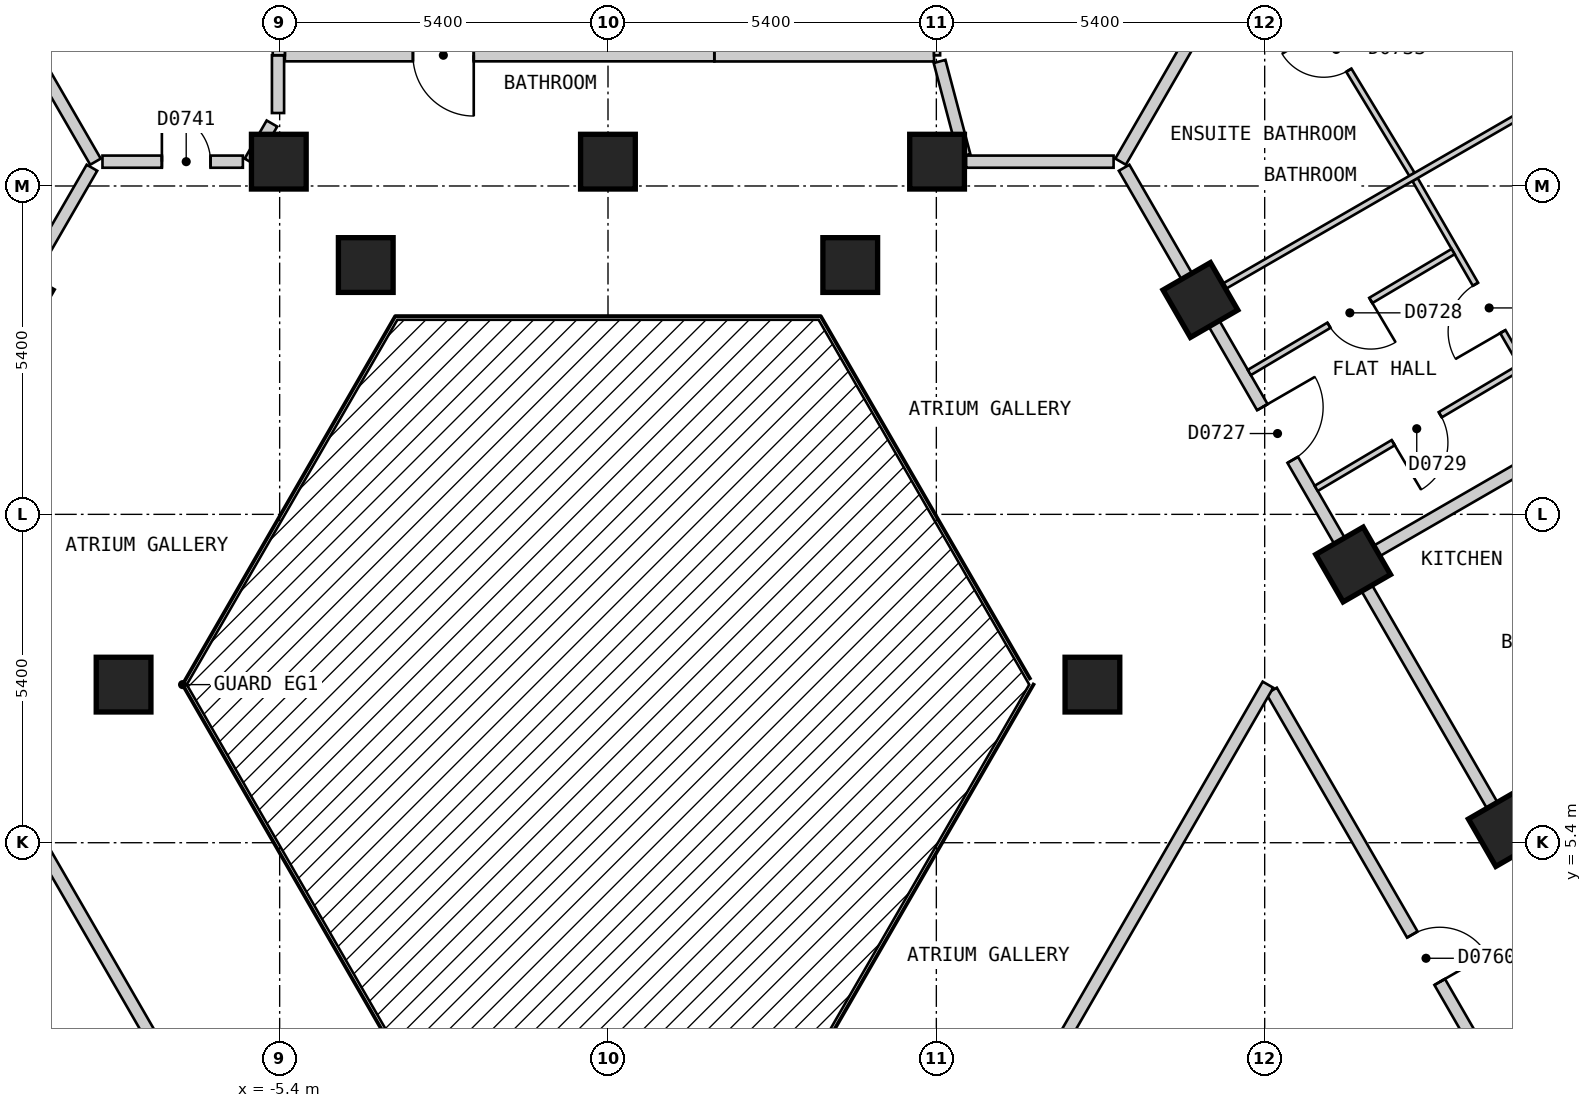
"""IFC4 building model, lengths in metres.
Left out: names, types, materials, properties, quantities, classifications, styles, units other than length and angle.
Written with IfcOpenShell. Run it as: python <this file> out.ifc"""

import sys

from ifc_helpers import new_model, si_unit, direction, frame, frame_2d, origin, origin_2d, place, context, subcontext, project, spatial, rectangle, extrude, element, fill, save


model = new_model("IFC4")
c1 = context("Model", 3, precision=1e-05, world=origin(), true_north=direction((0.0, 1.0)))
c2 = subcontext(c1, "Body", "Model", "MODEL_VIEW")
j1 = project(units=[si_unit("LENGTHUNIT", "METRE"), si_unit("PLANEANGLEUNIT", "RADIAN")], contexts=[c1])
p1 = place(None, origin())
s1 = spatial("IfcSite", under=j1, at=p1, CompositionType="ELEMENT")
p2 = place(p1, origin())
s2 = spatial("IfcBuilding", under=s1, at=p2, CompositionType="ELEMENT")
p3 = place(p2, frame((0.0, 0.0, 93.0)))
s3 = spatial("IfcBuildingStorey", under=s2, at=p3, CompositionType="ELEMENT", Elevation=93.0)
for number, where, z_axis, x_axis in (
    (1, (14.766, 5.625, 0.0), (0.0, 0.0, 1.0), (-0.5, 0.866, 0.0)),
    (2, (12.255, 9.975, 0.0), (0.0, 0.0, 1.0), (-0.5, 0.866, 0.0)),
    (3, (7.967, 8.0, 0.0), (0.0, 0.0, 1.0), (1.0, 0.0, 0.0)),
    (4, (9.743, 14.325, 0.0), (0.0, 0.0, 1.0), (-0.5, 0.866, 0.0)),
    (5, (5.412, 16.6, 0.0), (0.0, 0.0, 1.0), (-1.0, 0.0, 0.0)),
    (6, (3.984, 14.9, 0.0), (0.0, 0.0, 1.0), (1.0, 0.0, 0.0)),
    (7, (-0.001, 16.6, 0.0), (0.0, 0.0, 1.0), (-1.0, 0.0, 0.0)),
    (8, (-3.984, 14.9, 0.0), (0.0, 0.0, 1.0), (1.0, 0.0, 0.0)),
    (9, (-5.414, 16.6, 0.0), (0.0, 0.0, 1.0), (-1.0, 0.0, 0.0)),
    (10, (-9.743, 14.325, 0.0), (0.0, 0.0, 1.0), (-0.5, -0.866, 0.0)),
    (11, (-7.967, 8.0, 0.0), (0.0, 0.0, 1.0), (1.0, 0.0, 0.0)),
):
    element("IfcColumn", number, at=place(p3, frame(where, z_axis=z_axis, x_axis=x_axis)), inside=s3, PredefinedType="COLUMN", context=c2, shape_type="SweptSolid", body=[
        extrude(rectangle(XDim=0.9, YDim=0.9, at=origin_2d()), origin(), (0.0, 0.0, 1.0), 3.0),
    ])
p4 = place(p3, frame((-10.796, 7.899, 0.0), z_axis=(0.0, 0.0, 1.0), x_axis=(0.500010383074, -0.866019409031, 0.0)))
e12 = element("IfcWall", 12, at=p4, inside=s3, PredefinedType="PARTITIONING", context=c2, shape_type="SweptSolid", body=[
    extrude(rectangle(XDim=7.535, YDim=0.2, at=frame_2d((3.768, 0.0))), origin(), (0.0, 0.0, 1.0), 2.7),
])
p5 = place(p3, frame((5.453, 18.248, 0.0), z_axis=(0.0, 0.0, 1.0), x_axis=(0.255687088482, -0.9667595941, 0.0)))
e13 = element("IfcWall", 13, at=p5, inside=s3, PredefinedType="PARTITIONING", context=c2, shape_type="SweptSolid", body=[
    extrude(rectangle(XDim=1.6, YDim=0.2, at=frame_2d((0.8, 0.0))), origin(), (0.0, 0.0, 1.0), 2.7),
])
p6 = place(p3, frame((10.913, 7.899, 0.0), z_axis=(0.0, 0.0, 1.0), x_axis=(0.500028940566, -0.866008694296, 0.0)))
e14 = element("IfcWall", 14, at=p6, inside=s3, PredefinedType="PARTITIONING", context=c2, shape_type="SweptSolid", body=[
    extrude(rectangle(XDim=10.159, YDim=0.2, at=frame_2d((5.08, 0.0))), origin(), (0.0, 0.0, 1.0), 2.7),
])
p7 = place(p6, frame((4.63, 0.0, 0.0)))
e15 = element("IfcOpeningElement", 15, at=p7, cuts=e14, PredefinedType="OPENING", context=c2, shape_type="SweptSolid", body=[
    extrude(rectangle(XDim=0.9, YDim=2.1, at=frame_2d((0.45, 1.05))), frame((0.0, 0.11, 0.0), z_axis=(0.0, -1.0, 0.0), x_axis=(1.0, 0.0, 0.0)), (0.0, 0.0, 1.0), 0.22),
])
p8 = place(p3, frame((8.488, 16.5, 0.0), z_axis=(0.0, 0.0, 1.0), x_axis=(0.499986836607, -0.86603300354, 0.0)))
e16 = element("IfcWall", 16, at=p8, inside=s3, PredefinedType="PARTITIONING", context=c2, shape_type="SweptSolid", body=[
    extrude(rectangle(XDim=20.09, YDim=0.2, at=frame_2d((10.045, 0.0))), origin(), (0.0, 0.0, 1.0), 2.7),
])
p9 = place(p8, frame((14.569, 0.0, 0.0)))
e17 = element("IfcOpeningElement", 17, at=p9, cuts=e16, PredefinedType="OPENING", context=c2, shape_type="SweptSolid", body=[
    extrude(rectangle(XDim=1.0, YDim=2.1, at=frame_2d((0.5, 1.05))), frame((0.0, 0.11, 0.0), z_axis=(0.0, -1.0, 0.0), x_axis=(1.0, 0.0, 0.0)), (0.0, 0.0, 1.0), 0.22),
])
p10 = place(p8, frame((4.547, 0.0, 0.0)))
e18 = element("IfcOpeningElement", 18, at=p10, cuts=e16, PredefinedType="OPENING", context=c2, shape_type="SweptSolid", body=[
    extrude(rectangle(XDim=1.0, YDim=2.1, at=frame_2d((0.5, 1.05))), frame((0.0, 0.11, 0.0), z_axis=(0.0, -1.0, 0.0), x_axis=(1.0, 0.0, 0.0)), (0.0, 0.0, 1.0), 0.22),
])
p11 = place(p3, frame((-8.314, 16.6, 0.0), z_axis=(0.0, 0.0, 1.0), x_axis=(1.0, 0.0, 0.0)))
e19 = element("IfcWall", 19, at=p11, inside=s3, PredefinedType="PARTITIONING", context=c2, shape_type="SweptSolid", body=[
    extrude(rectangle(XDim=2.309, YDim=0.2, at=frame_2d((1.155, 0.0))), origin(), (0.0, 0.0, 1.0), 2.7),
])
p12 = place(p11, frame((0.977, 0.0, 0.0)))
e20 = element("IfcOpeningElement", 20, at=p12, cuts=e19, PredefinedType="OPENING", context=c2, shape_type="SweptSolid", body=[
    extrude(rectangle(XDim=0.8, YDim=2.1, at=frame_2d((0.4, 1.05))), frame((0.0, 0.11, 0.0), z_axis=(0.0, -1.0, 0.0), x_axis=(1.0, 0.0, 0.0)), (0.0, 0.0, 1.0), 0.22),
])
p13 = place(p3, frame((5.889, 16.6, 0.0), z_axis=(0.0, 0.0, 1.0), x_axis=(1.0, 0.0, 0.0)))
e21 = element("IfcWall", 21, at=p13, inside=s3, PredefinedType="PARTITIONING", context=c2, shape_type="SweptSolid", body=[
    extrude(rectangle(XDim=2.426, YDim=0.2, at=frame_2d((1.213, 0.0))), origin(), (0.0, 0.0, 1.0), 2.7),
])
p14 = place(p3, frame((1.75, 18.348, 0.0), z_axis=(0.0, 0.0, 1.0), x_axis=(1.0, 0.0, 0.0)))
e22 = element("IfcWall", 22, at=p14, inside=s3, PredefinedType="PARTITIONING", context=c2, shape_type="SweptSolid", body=[
    extrude(rectangle(XDim=3.612, YDim=0.2, at=frame_2d((1.806, 0.0))), origin(), (0.0, 0.0, 1.0), 2.7),
])
p15 = place(p3, frame((-5.314, 18.35, 0.0), z_axis=(0.0, 0.0, 1.0), x_axis=(1.0, 0.0, 0.0)))
e23 = element("IfcWall", 23, at=p15, inside=s3, PredefinedType="PARTITIONING", context=c2, shape_type="SweptSolid", body=[
    extrude(rectangle(XDim=7.062, YDim=0.2, at=frame_2d((3.531, 0.0))), origin(), (0.0, 0.0, 1.0), 2.7),
])
p16 = place(p15, frame((2.106, 0.0, 0.0)))
e24 = element("IfcOpeningElement", 24, at=p16, cuts=e23, PredefinedType="OPENING", context=c2, shape_type="SweptSolid", body=[
    extrude(rectangle(XDim=1.0, YDim=2.1, at=frame_2d((0.5, 1.05))), frame((0.0, 0.11, 0.0), z_axis=(0.0, -1.0, 0.0), x_axis=(1.0, 0.0, 0.0)), (0.0, 0.0, 1.0), 0.22),
])
p17 = place(p3, frame((6.928, 1.2, 0.0), z_axis=(0.0, 0.0, 1.0), x_axis=(0.500055327065, 0.865993458332, 0.0)))
e25 = element("IfcWall", 25, at=p17, inside=s3, PredefinedType="PARTITIONING", context=c2, shape_type="SweptSolid", body=[
    extrude(rectangle(XDim=7.851, YDim=0.2, at=frame_2d((3.926, 0.0))), origin(), (0.0, 0.0, 1.0), 2.7),
])
p18 = place(p3, frame((-5.889, 16.6, 0.0), z_axis=(0.0, 0.0, 1.0), x_axis=(0.499839240638, 0.866118198353, 0.0)))
e26 = element("IfcWall", 26, at=p18, inside=s3, PredefinedType="PARTITIONING", context=c2, shape_type="SweptSolid", body=[
    extrude(rectangle(XDim=0.724, YDim=0.2, at=frame_2d((0.362, 0.0))), origin(), (0.0, 0.0, 1.0), 2.7),
])
p19 = place(p3, frame((-18.533, -0.901, 0.0), z_axis=(0.0, 0.0, 1.0), x_axis=(0.499981198768, 0.866036258409, 0.0)))
e27 = element("IfcWall", 27, at=p19, inside=s3, PredefinedType="PARTITIONING", context=c2, shape_type="SweptSolid", body=[
    extrude(rectangle(XDim=20.093, YDim=0.2, at=frame_2d((10.046, 0.0))), origin(), (0.0, 0.0, 1.0), 2.7),
])
p20 = place(p19, frame((14.57, 0.0, 0.0)))
e28 = element("IfcOpeningElement", 28, at=p20, cuts=e27, PredefinedType="OPENING", context=c2, shape_type="SweptSolid", body=[
    extrude(rectangle(XDim=1.0, YDim=2.1, at=frame_2d((0.5, 1.05))), frame((0.0, 0.11, 0.0), z_axis=(0.0, -1.0, 0.0), x_axis=(1.0, 0.0, 0.0)), (0.0, 0.0, 1.0), 0.22),
])
p21 = place(p19, frame((4.523, 0.0, 0.0)))
e29 = element("IfcOpeningElement", 29, at=p21, cuts=e27, PredefinedType="OPENING", context=c2, shape_type="SweptSolid", body=[
    extrude(rectangle(XDim=1.0, YDim=2.1, at=frame_2d((0.5, 1.05))), frame((0.0, 0.11, 0.0), z_axis=(0.0, -1.0, 0.0), x_axis=(1.0, 0.0, 0.0)), (0.0, 0.0, 1.0), 0.22),
])
p22 = place(p3, frame((-5.427, 17.4, 0.0), z_axis=(0.0, 0.0, 1.0), x_axis=(0.0, 1.0, 0.0)))
e30 = element("IfcWall", 30, at=p22, inside=s3, PredefinedType="PARTITIONING", context=c2, shape_type="SweptSolid", body=[
    extrude(rectangle(XDim=0.95, YDim=0.2, at=frame_2d((0.475, 0.0))), origin(), (0.0, 0.0, 1.0), 2.7),
])
p23 = place(p3, frame((10.706, 20.543, 0.0), z_axis=(0.0, 0.0, 1.0), x_axis=(0.518240414093, -0.855234981278, 0.0)))
e31 = element("IfcWall", 31, at=p23, inside=s3, PredefinedType="PARTITIONING", context=c2, shape_type="SweptSolid", body=[
    extrude(rectangle(XDim=4.855, YDim=0.1, at=frame_2d((2.427, 0.0))), origin(), (0.0, 0.0, 1.0), 2.7),
])
p24 = place(p23, frame((2.052, 0.0, 0.0)))
e32 = element("IfcOpeningElement", 32, at=p24, cuts=e31, PredefinedType="OPENING", context=c2, shape_type="SweptSolid", body=[
    extrude(rectangle(XDim=0.8, YDim=2.1, at=frame_2d((0.4, 1.05))), frame((0.0, 0.06, 0.0), z_axis=(0.0, -1.0, 0.0), x_axis=(1.0, 0.0, 0.0)), (0.0, 0.0, 1.0), 0.12),
])
p25 = place(p3, frame((13.273, 16.305, 0.0), z_axis=(0.0, 0.0, 1.0), x_axis=(0.500093956194, -0.865971151354, 0.0)))
e33 = element("IfcWall", 33, at=p25, inside=s3, PredefinedType="PARTITIONING", context=c2, shape_type="SweptSolid", body=[
    extrude(rectangle(XDim=4.873, YDim=0.1, at=frame_2d((2.437, 0.0))), origin(), (0.0, 0.0, 1.0), 2.7),
])
p26 = place(p25, frame((1.987, 0.0, 0.0)))
e34 = element("IfcOpeningElement", 34, at=p26, cuts=e33, PredefinedType="OPENING", context=c2, shape_type="SweptSolid", body=[
    extrude(rectangle(XDim=0.9, YDim=2.1, at=frame_2d((0.45, 1.05))), frame((0.0, 0.06, 0.0), z_axis=(0.0, -1.0, 0.0), x_axis=(1.0, 0.0, 0.0)), (0.0, 0.0, 1.0), 0.12),
])
p27 = place(p3, frame((5.412, 22.005, 0.0), z_axis=(0.0, 0.0, 1.0), x_axis=(0.0, -1.0, 0.0)))
e35 = element("IfcWall", 35, at=p27, inside=s3, PredefinedType="PARTITIONING", context=c2, shape_type="SweptSolid", body=[
    extrude(rectangle(XDim=3.657, YDim=0.1, at=frame_2d((1.829, 0.0))), origin(), (0.0, 0.0, 1.0), 2.7),
])
p28 = place(p3, frame((14.853, 5.675, 0.0), z_axis=(0.0, 0.0, 1.0), x_axis=(0.866016855193, 0.500014806302, 0.0)))
e36 = element("IfcWall", 36, at=p28, inside=s3, PredefinedType="PARTITIONING", context=c2, shape_type="SweptSolid", body=[
    extrude(rectangle(XDim=10.0, YDim=0.1, at=frame_2d((5.0, 0.0))), origin(), (0.0, 0.0, 1.0), 2.7),
])
p29 = place(p28, frame((1.6, 0.0, 0.0)))
e37 = element("IfcOpeningElement", 37, at=p29, cuts=e36, PredefinedType="OPENING", context=c2, shape_type="SweptSolid", body=[
    extrude(rectangle(XDim=0.8, YDim=2.1, at=frame_2d((0.4, 1.05))), frame((0.0, 0.06, 0.0), z_axis=(0.0, -1.0, 0.0), x_axis=(1.0, 0.0, 0.0)), (0.0, 0.0, 1.0), 0.12),
])
p30 = place(p28, frame((6.6, 0.0, 0.0)))
e38 = element("IfcOpeningElement", 38, at=p30, cuts=e36, PredefinedType="OPENING", context=c2, shape_type="SweptSolid", body=[
    extrude(rectangle(XDim=0.9, YDim=2.1, at=frame_2d((0.45, 1.05))), frame((0.0, 0.06, 0.0), z_axis=(0.0, -1.0, 0.0), x_axis=(1.0, 0.0, 0.0)), (0.0, 0.0, 1.0), 0.12),
])
p31 = place(p3, frame((9.83, 14.375, 0.0), z_axis=(0.0, 0.0, 1.0), x_axis=(0.866016855193, 0.500014806302, 0.0)))
e39 = element("IfcWall", 39, at=p31, inside=s3, PredefinedType="PARTITIONING", context=c2, shape_type="SweptSolid", body=[
    extrude(rectangle(XDim=10.0, YDim=0.1, at=frame_2d((5.0, 0.0))), origin(), (0.0, 0.0, 1.0), 2.7),
])
p32 = place(p31, frame((6.523, 0.0, 0.0)))
e40 = element("IfcOpeningElement", 40, at=p32, cuts=e39, PredefinedType="OPENING", context=c2, shape_type="SweptSolid", body=[
    extrude(rectangle(XDim=0.9, YDim=2.1, at=frame_2d((0.45, 1.05))), frame((0.0, 0.06, 0.0), z_axis=(0.0, -1.0, 0.0), x_axis=(1.0, 0.0, 0.0)), (0.0, 0.0, 1.0), 0.12),
])
p33 = place(p3, frame((11.647, 11.227, 0.0), z_axis=(0.0, 0.0, 1.0), x_axis=(0.859997349349, 0.510298500011, 0.0)))
e41 = element("IfcWall", 41, at=p33, inside=s3, PredefinedType="PARTITIONING", context=c2, shape_type="SweptSolid", body=[
    extrude(rectangle(XDim=3.898, YDim=0.1, at=frame_2d((1.949, 0.0))), origin(), (0.0, 0.0, 1.0), 2.7),
])
p34 = place(p33, frame((1.473, 0.0, 0.0)))
e42 = element("IfcOpeningElement", 42, at=p34, cuts=e41, PredefinedType="OPENING", context=c2, shape_type="SweptSolid", body=[
    extrude(rectangle(XDim=0.9, YDim=2.1, at=frame_2d((0.45, 1.05))), frame((0.0, 0.06, 0.0), z_axis=(0.0, -1.0, 0.0), x_axis=(1.0, 0.0, 0.0)), (0.0, 0.0, 1.0), 0.12),
])
p35 = place(p3, frame((10.547, 13.133, 0.0), z_axis=(0.0, 0.0, 1.0), x_axis=(0.860090994311, 0.510140648749, 0.0)))
e43 = element("IfcWall", 43, at=p35, inside=s3, PredefinedType="PARTITIONING", context=c2, shape_type="SweptSolid", body=[
    extrude(rectangle(XDim=3.897, YDim=0.1, at=frame_2d((1.948, 0.0))), origin(), (0.0, 0.0, 1.0), 2.7),
])
p36 = place(p35, frame((1.523, 0.0, 0.0)))
e44 = element("IfcOpeningElement", 44, at=p36, cuts=e43, PredefinedType="OPENING", context=c2, shape_type="SweptSolid", body=[
    extrude(rectangle(XDim=0.8, YDim=2.1, at=frame_2d((0.4, 1.05))), frame((0.0, 0.06, 0.0), z_axis=(0.0, -1.0, 0.0), x_axis=(1.0, 0.0, 0.0)), (0.0, 0.0, 1.0), 0.12),
])
p37 = place(p3, frame((-10.727, 20.58, 0.0), z_axis=(0.0, 0.0, 1.0), x_axis=(0.500041272028, -0.866001574057, 0.0)))
e45 = element("IfcWall", 45, at=p37, inside=s3, PredefinedType="PARTITIONING", context=c2, shape_type="SweptSolid", body=[
    extrude(rectangle(XDim=4.596, YDim=0.2, at=frame_2d((2.298, 0.0))), origin(), (0.0, 0.0, 1.0), 2.7),
])
p38 = place(p3, frame((-5.414, 26.7, 0.0), z_axis=(0.0, 0.0, 1.0), x_axis=(0.0, -1.0, 0.0)))
e46 = element("IfcWall", 46, at=p38, inside=s3, PredefinedType="PARTITIONING", context=c2, shape_type="SweptSolid", body=[
    extrude(rectangle(XDim=8.35, YDim=0.2, at=frame_2d((4.175, 0.0))), origin(), (0.0, 0.0, 1.0), 2.7),
])
p39 = place(p3, frame((8.43, 16.6, 0.0), z_axis=(0.0, 0.0, 1.0), x_axis=(0.500072613115, 0.865983476524, 0.0)))
e47 = element("IfcWall", 47, at=p39, inside=s3, PredefinedType="PARTITIONING", context=c2, shape_type="SweptSolid", body=[
    extrude(rectangle(XDim=4.385, YDim=0.2, at=frame_2d((2.193, 0.0))), origin(), (0.0, 0.0, 1.0), 2.7),
])
p40 = place(p3, frame((12.342, 10.025, 0.0), z_axis=(0.0, 0.0, 1.0), x_axis=(0.866033886885, 0.499985306551, 0.0)))
e48 = element("IfcWall", 48, at=p40, inside=s3, PredefinedType="PARTITIONING", context=c2, shape_type="SweptSolid", body=[
    extrude(rectangle(XDim=3.966, YDim=0.2, at=frame_2d((1.983, 0.0))), origin(), (0.0, 0.0, 1.0), 2.7),
])
p41 = place(p10, origin())
e49 = element("IfcDoor", 49, at=p41, inside=s3, OperationType="SINGLE_SWING_LEFT", PredefinedType="DOOR", context=c2, shape_type="SweptSolid", body=[
    extrude(rectangle(XDim=1.0, YDim=2.1, at=frame_2d((0.5, 1.05))), frame((0.0, 0.025, 0.0), z_axis=(0.0, -1.0, 0.0), x_axis=(1.0, 0.0, 0.0)), (0.0, 0.0, 1.0), 0.05),
])
fill(e18, e49)
p42 = place(p36, origin())
e50 = element("IfcDoor", 50, at=p42, inside=s3, OperationType="SINGLE_SWING_RIGHT", PredefinedType="DOOR", context=c2, shape_type="SweptSolid", body=[
    extrude(rectangle(XDim=0.8, YDim=2.1, at=frame_2d((0.4, 1.05))), frame((0.0, 0.025, 0.0), z_axis=(0.0, -1.0, 0.0), x_axis=(1.0, 0.0, 0.0)), (0.0, 0.0, 1.0), 0.05),
])
fill(e44, e50)
p43 = place(p34, origin())
e51 = element("IfcDoor", 51, at=p43, inside=s3, OperationType="SINGLE_SWING_LEFT", PredefinedType="DOOR", context=c2, shape_type="SweptSolid", body=[
    extrude(rectangle(XDim=0.9, YDim=2.1, at=frame_2d((0.45, 1.05))), frame((0.0, 0.025, 0.0), z_axis=(0.0, -1.0, 0.0), x_axis=(1.0, 0.0, 0.0)), (0.0, 0.0, 1.0), 0.05),
])
fill(e42, e51)
p44 = place(p26, origin())
e52 = element("IfcDoor", 52, at=p44, inside=s3, OperationType="SINGLE_SWING_RIGHT", PredefinedType="DOOR", context=c2, shape_type="SweptSolid", body=[
    extrude(rectangle(XDim=0.9, YDim=2.1, at=frame_2d((0.45, 1.05))), frame((0.0, 0.025, 0.0), z_axis=(0.0, -1.0, 0.0), x_axis=(1.0, 0.0, 0.0)), (0.0, 0.0, 1.0), 0.05),
])
fill(e34, e52)
p45 = place(p24, origin())
e53 = element("IfcDoor", 53, at=p45, inside=s3, OperationType="SINGLE_SWING_LEFT", PredefinedType="DOOR", context=c2, shape_type="SweptSolid", body=[
    extrude(rectangle(XDim=0.8, YDim=2.1, at=frame_2d((0.4, 1.05))), frame((0.0, 0.025, 0.0), z_axis=(0.0, -1.0, 0.0), x_axis=(1.0, 0.0, 0.0)), (0.0, 0.0, 1.0), 0.05),
])
fill(e32, e53)
p46 = place(p16, origin())
e54 = element("IfcDoor", 54, at=p46, inside=s3, OperationType="SINGLE_SWING_RIGHT", PredefinedType="DOOR", context=c2, shape_type="SweptSolid", body=[
    extrude(rectangle(XDim=1.0, YDim=2.1, at=frame_2d((0.5, 1.05))), frame((0.0, 0.025, 0.0), z_axis=(0.0, -1.0, 0.0), x_axis=(1.0, 0.0, 0.0)), (0.0, 0.0, 1.0), 0.05),
])
fill(e24, e54)
p47 = place(p12, origin())
e55 = element("IfcDoor", 55, at=p47, inside=s3, OperationType="SINGLE_SWING_LEFT", PredefinedType="DOOR", context=c2, shape_type="SweptSolid", body=[
    extrude(rectangle(XDim=0.8, YDim=2.1, at=frame_2d((0.4, 1.05))), frame((0.0, 0.025, 0.0), z_axis=(0.0, -1.0, 0.0), x_axis=(1.0, 0.0, 0.0)), (0.0, 0.0, 1.0), 0.05),
])
fill(e20, e55)
p48 = place(p7, origin())
e56 = element("IfcDoor", 56, at=p48, inside=s3, OperationType="SINGLE_SWING_RIGHT", PredefinedType="DOOR", context=c2, shape_type="SweptSolid", body=[
    extrude(rectangle(XDim=0.9, YDim=2.1, at=frame_2d((0.45, 1.05))), frame((0.0, 0.025, 0.0), z_axis=(0.0, -1.0, 0.0), x_axis=(1.0, 0.0, 0.0)), (0.0, 0.0, 1.0), 0.05),
])
fill(e15, e56)
save(model, sys.argv[1])
